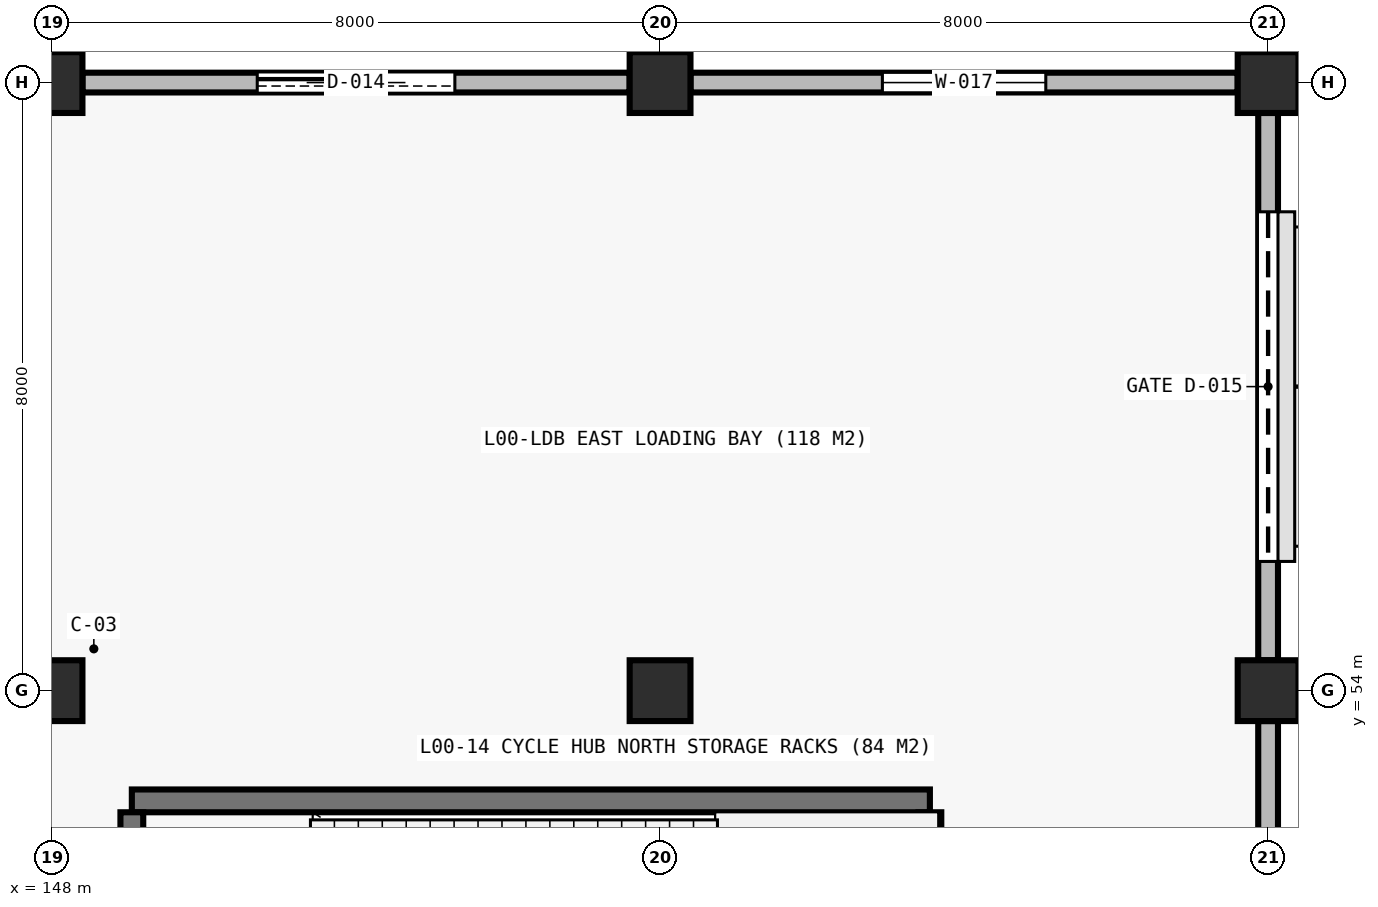
"""IFC4 building model, lengths in metres.
Left out: names, types, materials, properties, quantities, classifications, styles, units other than length and angle.
Written with IfcOpenShell. Run it as: python <this file> out.ifc"""

import sys

from ifc_helpers import new_model, si_unit, direction, frame, frame_2d, origin, origin_2d, place, context, subcontext, project, spatial, rectangle, extrude, element, fill, save


model = new_model("IFC4")
c1 = context("Model", 3, precision=1e-05, world=origin(), true_north=direction((0.0, 1.0)))
c2 = subcontext(c1, "Body", "Model", "MODEL_VIEW")
j1 = project(units=[si_unit("LENGTHUNIT", "METRE"), si_unit("PLANEANGLEUNIT", "RADIAN")], contexts=[c1])
p1 = place(None, origin())
s1 = spatial("IfcSite", under=j1, at=p1, CompositionType="ELEMENT")
p2 = place(p1, origin())
s2 = spatial("IfcBuilding", under=s1, at=p2, CompositionType="ELEMENT")
p3 = place(p2, origin())
s3 = spatial("IfcBuildingStorey", under=s2, at=p3, CompositionType="ELEMENT", Elevation=0.0)
for number, where, z_axis, x_axis in (
    (1, (148.0, 54.0, 0.0), (0.0, 0.0, 1.0), (1.0, 0.0, 0.0)),
    (2, (148.0, 62.0, 0.0), (0.0, 0.0, 1.0), (1.0, 0.0, 0.0)),
    (3, (156.0, 54.0, 0.0), (0.0, 0.0, 1.0), (1.0, 0.0, 0.0)),
    (4, (156.0, 62.0, 0.0), (0.0, 0.0, 1.0), (1.0, 0.0, 0.0)),
    (5, (164.0, 54.0, 0.0), (0.0, 0.0, 1.0), (1.0, 0.0, 0.0)),
    (6, (164.0, 62.0, 0.0), (0.0, 0.0, 1.0), (1.0, 0.0, 0.0)),
):
    element("IfcColumn", number, at=place(p3, frame(where, z_axis=z_axis, x_axis=x_axis)), inside=s3, PredefinedType="COLUMN", context=c2, shape_type="SweptSolid", body=[
        extrude(rectangle(XDim=0.8, YDim=0.8, at=origin_2d()), origin(), (0.0, 0.0, 1.0), 6.02),
    ])
p4 = place(p3, frame((149.05, 52.55, 0.0), z_axis=(0.0, 0.0, 1.0), x_axis=(1.0, 0.0, 0.0)))
e7 = element("IfcWall", 7, at=p4, inside=s3, PredefinedType="SHEAR", context=c2, shape_type="SweptSolid", body=[
    extrude(rectangle(XDim=10.5, YDim=0.3, at=frame_2d((5.25, 0.0))), origin(), (0.0, 0.0, 1.0), 6.02),
])
for number, where, z_axis, x_axis in (
    (8, (149.05, 47.2, 0.0), (0.0, 0.0, 1.0), (0.0, 1.0, 0.0)),
    (9, (159.55, 47.2, 0.0), (0.0, 0.0, 1.0), (0.0, 1.0, 0.0)),
):
    element("IfcWall", number, at=place(p3, frame(where, z_axis=z_axis, x_axis=x_axis)), inside=s3, PredefinedType="SHEAR", context=c2, shape_type="SweptSolid", body=[
        extrude(rectangle(XDim=5.2, YDim=0.3, at=frame_2d((2.6, 0.0))), origin(), (0.0, 0.0, 1.0), 6.02),
    ])
p5 = place(p3, frame((148.4, 62.0, 0.0), z_axis=(0.0, 0.0, 1.0), x_axis=(1.0, 0.0, 0.0)))
e10 = element("IfcWall", 10, at=p5, inside=s3, PredefinedType="STANDARD", context=c2, shape_type="SweptSolid", body=[
    extrude(rectangle(XDim=7.2, YDim=0.26, at=frame_2d((3.6, 0.0))), origin(), (0.0, 0.0, 1.0), 4.92),
])
p6 = place(p5, frame((2.3, 0.0, 0.0)))
e11 = element("IfcOpeningElement", 11, at=p6, cuts=e10, PredefinedType="OPENING", context=c2, shape_type="SweptSolid", body=[
    extrude(rectangle(XDim=2.6, YDim=2.5, at=frame_2d((1.3, 1.25))), frame((0.0, 0.14, 0.0), z_axis=(0.0, -1.0, 0.0), x_axis=(1.0, 0.0, 0.0)), (0.0, 0.0, 1.0), 0.28),
])
p7 = place(p3, frame((156.4, 62.0, 0.0), z_axis=(0.0, 0.0, 1.0), x_axis=(1.0, 0.0, 0.0)))
e12 = element("IfcWall", 12, at=p7, inside=s3, PredefinedType="STANDARD", context=c2, shape_type="SweptSolid", body=[
    extrude(rectangle(XDim=7.2, YDim=0.26, at=frame_2d((3.6, 0.0))), origin(), (0.0, 0.0, 1.0), 4.92),
])
p8 = place(p7, frame((2.525, 0.0, 0.95)))
e13 = element("IfcOpeningElement", 13, at=p8, cuts=e12, PredefinedType="OPENING", context=c2, shape_type="SweptSolid", body=[
    extrude(rectangle(XDim=2.15, YDim=1.5, at=frame_2d((1.075, 0.75))), frame((0.0, 0.14, 0.0), z_axis=(0.0, -1.0, 0.0), x_axis=(1.0, 0.0, 0.0)), (0.0, 0.0, 1.0), 0.28),
])
p9 = place(p3, frame((164.0, 61.6, 0.0), z_axis=(0.0, 0.0, 1.0), x_axis=(0.0, -1.0, 0.0)))
e14 = element("IfcWall", 14, at=p9, inside=s3, PredefinedType="STANDARD", context=c2, shape_type="SweptSolid", body=[
    extrude(rectangle(XDim=7.2, YDim=0.26, at=frame_2d((3.6, 0.0))), origin(), (0.0, 0.0, 1.0), 5.408),
])
p10 = place(p9, frame((1.3, 0.0, 0.0)))
e15 = element("IfcOpeningElement", 15, at=p10, cuts=e14, PredefinedType="OPENING", context=c2, shape_type="SweptSolid", body=[
    extrude(rectangle(XDim=4.6, YDim=4.4, at=frame_2d((2.3, 2.2))), frame((0.0, 0.14, 0.0), z_axis=(0.0, -1.0, 0.0), x_axis=(1.0, 0.0, 0.0)), (0.0, 0.0, 1.0), 0.28),
])
p11 = place(p3, frame((164.0, 53.6, 0.0), z_axis=(0.0, 0.0, 1.0), x_axis=(0.0, -1.0, 0.0)))
e16 = element("IfcWall", 16, at=p11, inside=s3, PredefinedType="STANDARD", context=c2, shape_type="SweptSolid", body=[
    extrude(rectangle(XDim=7.2, YDim=0.26, at=frame_2d((3.6, 0.0))), origin(), (0.0, 0.0, 1.0), 5.408),
])
p12 = place(p11, frame((2.525, 0.0, 0.95)))
e17 = element("IfcOpeningElement", 17, at=p12, cuts=e16, PredefinedType="OPENING", context=c2, shape_type="SweptSolid", body=[
    extrude(rectangle(XDim=2.15, YDim=1.5, at=frame_2d((1.075, 0.75))), frame((0.0, 0.14, 0.0), z_axis=(0.0, -1.0, 0.0), x_axis=(1.0, 0.0, 0.0)), (0.0, 0.0, 1.0), 0.28),
])
p13 = place(p6, origin())
e18 = element("IfcDoor", 18, at=p13, inside=s3, OperationType="SLIDING_TO_LEFT", PredefinedType="DOOR", context=c2, shape_type="SweptSolid", body=[
    extrude(rectangle(XDim=2.6, YDim=2.5, at=frame_2d((1.3, 1.25))), frame((0.0, 0.025, 0.0), z_axis=(0.0, -1.0, 0.0), x_axis=(1.0, 0.0, 0.0)), (0.0, 0.0, 1.0), 0.05),
])
fill(e11, e18)
p14 = place(p8, origin())
e19 = element("IfcWindow", 19, at=p14, inside=s3, PartitioningType="SINGLE_PANEL", PredefinedType="WINDOW", context=c2, shape_type="SweptSolid", body=[
    extrude(rectangle(XDim=2.15, YDim=1.5, at=frame_2d((1.075, 0.75))), frame((0.0, 0.03, 0.0), z_axis=(0.0, -1.0, 0.0), x_axis=(1.0, 0.0, 0.0)), (0.0, 0.0, 1.0), 0.06),
])
fill(e13, e19)
p15 = place(p10, origin())
e20 = element("IfcDoor", 20, at=p15, inside=s3, OperationType="ROLLINGUP", PredefinedType="GATE", context=c2, shape_type="SweptSolid", body=[
    extrude(rectangle(XDim=4.6, YDim=4.4, at=frame_2d((2.3, 2.2))), frame((0.0, 0.025, 0.0), z_axis=(0.0, -1.0, 0.0), x_axis=(1.0, 0.0, 0.0)), (0.0, 0.0, 1.0), 0.05),
])
fill(e15, e20)
save(model, sys.argv[1])
